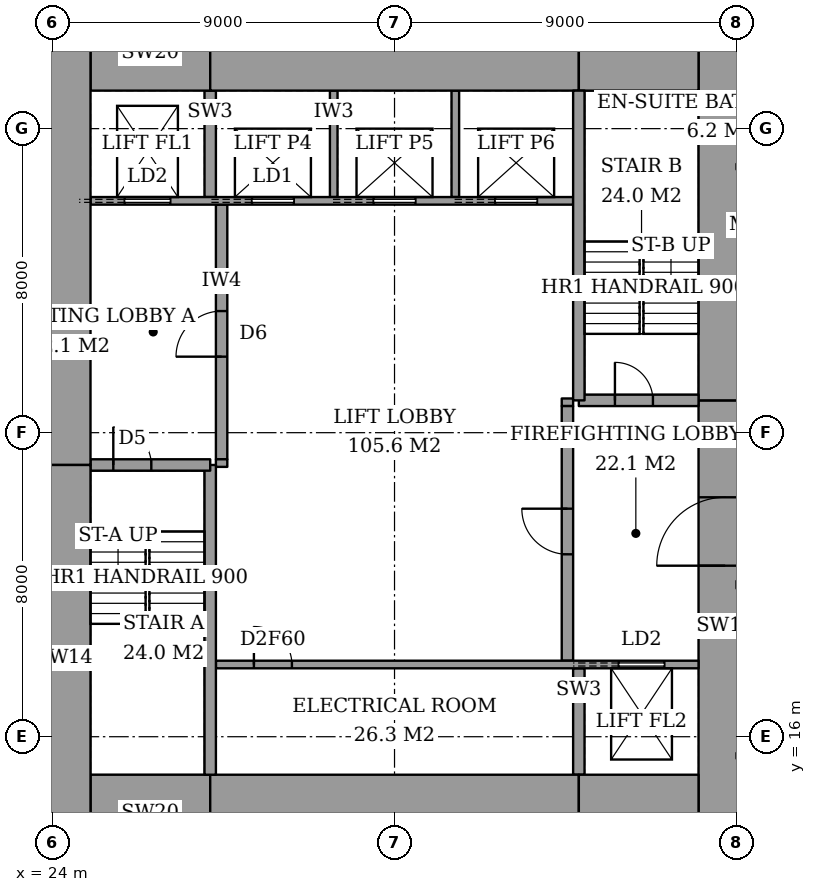
"""IFC4 building model, lengths in metres.
Left out: names, types, materials, properties, quantities, classifications, styles, units other than length and angle.
Written with IfcOpenShell. Run it as: python <this file> out.ifc"""

import sys

from ifc_helpers import new_model, si_unit, direction, frame, frame_2d, origin, place, context, subcontext, project, spatial, rectangle, extrude, element, fill, save


model = new_model("IFC4")
c1 = context("Model", 3, precision=1e-05, world=origin(), true_north=direction((0.0, 1.0)))
c2 = subcontext(c1, "Body", "Model", "MODEL_VIEW")
j1 = project(units=[si_unit("LENGTHUNIT", "METRE"), si_unit("PLANEANGLEUNIT", "RADIAN")], contexts=[c1])
p1 = place(None, origin())
s1 = spatial("IfcSite", under=j1, at=p1, CompositionType="ELEMENT")
p2 = place(p1, origin())
s2 = spatial("IfcBuilding", under=s1, at=p2, CompositionType="ELEMENT")
p3 = place(p2, frame((0.0, 0.0, 255.6)))
s3 = spatial("IfcBuildingStorey", under=s2, at=p3, CompositionType="ELEMENT", Elevation=255.6)
p4 = place(p3, frame((25.0, 14.0, 0.0), z_axis=(0.0, 0.0, 1.0), x_axis=(1.0, 0.0, 0.0)))
e1 = element("IfcWall", 1, at=p4, inside=s3, PredefinedType="SHEAR", context=c2, shape_type="SweptSolid", body=[
    extrude(rectangle(XDim=3.15, YDim=2.0, at=frame_2d((1.575, 0.0))), origin(), (0.0, 0.0, 1.0), 3.6),
])
p5 = place(p3, frame((28.15, 14.0, 0.0), z_axis=(0.0, 0.0, 1.0), x_axis=(1.0, 0.0, 0.0)))
e2 = element("IfcWall", 2, at=p5, inside=s3, PredefinedType="SHEAR", context=c2, shape_type="SweptSolid", body=[
    extrude(rectangle(XDim=9.7, YDim=2.0, at=frame_2d((4.85, 0.0))), origin(), (0.0, 0.0, 1.0), 3.6),
])
for number, where, z_axis, x_axis in (
    (3, (37.85, 14.0, 0.0), (0.0, 0.0, 1.0), (1.0, 0.0, 0.0)),
    (4, (25.0, 34.0, 0.0), (0.0, 0.0, 1.0), (1.0, 0.0, 0.0)),
):
    element("IfcWall", number, at=place(p3, frame(where, z_axis=z_axis, x_axis=x_axis)), inside=s3, PredefinedType="SHEAR", context=c2, shape_type="SweptSolid", body=[
        extrude(rectangle(XDim=3.15, YDim=2.0, at=frame_2d((1.575, 0.0))), origin(), (0.0, 0.0, 1.0), 3.6),
    ])
p6 = place(p3, frame((28.15, 34.0, 0.0), z_axis=(0.0, 0.0, 1.0), x_axis=(1.0, 0.0, 0.0)))
e5 = element("IfcWall", 5, at=p6, inside=s3, PredefinedType="SHEAR", context=c2, shape_type="SweptSolid", body=[
    extrude(rectangle(XDim=9.7, YDim=2.0, at=frame_2d((4.85, 0.0))), origin(), (0.0, 0.0, 1.0), 3.6),
])
p7 = place(p3, frame((37.85, 34.0, 0.0), z_axis=(0.0, 0.0, 1.0), x_axis=(1.0, 0.0, 0.0)))
e6 = element("IfcWall", 6, at=p7, inside=s3, PredefinedType="SHEAR", context=c2, shape_type="SweptSolid", body=[
    extrude(rectangle(XDim=3.15, YDim=2.0, at=frame_2d((1.575, 0.0))), origin(), (0.0, 0.0, 1.0), 3.6),
])
p8 = place(p3, frame((24.3, 13.0, 0.0), z_axis=(0.0, 0.0, 1.0), x_axis=(0.0, 1.0, 0.0)))
e7 = element("IfcWall", 7, at=p8, inside=s3, PredefinedType="SHEAR", context=c2, shape_type="SweptSolid", body=[
    extrude(rectangle(XDim=10.15, YDim=1.4, at=frame_2d((5.075, 0.0))), origin(), (0.0, 0.0, 1.0), 3.6),
])
p9 = place(p3, frame((24.3, 23.15, 0.0), z_axis=(0.0, 0.0, 1.0), x_axis=(0.0, 1.0, 0.0)))
e8 = element("IfcWall", 8, at=p9, inside=s3, PredefinedType="SHEAR", context=c2, shape_type="SweptSolid", body=[
    extrude(rectangle(XDim=11.85, YDim=1.4, at=frame_2d((5.925, 0.0))), origin(), (0.0, 0.0, 1.0), 3.6),
])
p10 = place(p3, frame((41.7, 13.0, 0.0), z_axis=(0.0, 0.0, 1.0), x_axis=(0.0, 1.0, 0.0)))
e9 = element("IfcWall", 9, at=p10, inside=s3, PredefinedType="SHEAR", context=c2, shape_type="SweptSolid", body=[
    extrude(rectangle(XDim=11.85, YDim=1.4, at=frame_2d((5.925, 0.0))), origin(), (0.0, 0.0, 1.0), 3.6),
])
p11 = place(p10, frame((7.5, 0.0, 0.0)))
e10 = element("IfcOpeningElement", 10, at=p11, cuts=e9, PredefinedType="OPENING", context=c2, shape_type="SweptSolid", body=[
    extrude(rectangle(XDim=1.8, YDim=2.4, at=frame_2d((0.9, 1.2))), frame((0.0, 0.71, 0.0), z_axis=(0.0, -1.0, 0.0), x_axis=(1.0, 0.0, 0.0)), (0.0, 0.0, 1.0), 1.42),
])
p12 = place(p3, frame((41.7, 24.85, 0.0), z_axis=(0.0, 0.0, 1.0), x_axis=(0.0, 1.0, 0.0)))
e11 = element("IfcWall", 11, at=p12, inside=s3, PredefinedType="SHEAR", context=c2, shape_type="SweptSolid", body=[
    extrude(rectangle(XDim=10.15, YDim=1.4, at=frame_2d((5.075, 0.0))), origin(), (0.0, 0.0, 1.0), 3.6),
])
p13 = place(p3, frame((28.15, 15.0, 0.0), z_axis=(0.0, 0.0, 1.0), x_axis=(0.0, 1.0, 0.0)))
e12 = element("IfcWall", 12, at=p13, inside=s3, PredefinedType="SHEAR", context=c2, shape_type="SweptSolid", body=[
    extrude(rectangle(XDim=8.15, YDim=0.3, at=frame_2d((4.075, 0.0))), origin(), (0.0, 0.0, 1.0), 3.6),
])
p14 = place(p3, frame((25.0, 23.15, 0.0), z_axis=(0.0, 0.0, 1.0), x_axis=(1.0, 0.0, 0.0)))
e13 = element("IfcWall", 13, at=p14, inside=s3, PredefinedType="SHEAR", context=c2, shape_type="SweptSolid", body=[
    extrude(rectangle(XDim=3.15, YDim=0.3, at=frame_2d((1.575, 0.0))), origin(), (0.0, 0.0, 1.0), 3.6),
])
p15 = place(p14, frame((0.6, 0.0, 0.0)))
e14 = element("IfcOpeningElement", 14, at=p15, cuts=e13, PredefinedType="OPENING", context=c2, shape_type="SweptSolid", body=[
    extrude(rectangle(XDim=1.0, YDim=2.1, at=frame_2d((0.5, 1.05))), frame((0.0, 0.16, 0.0), z_axis=(0.0, -1.0, 0.0), x_axis=(1.0, 0.0, 0.0)), (0.0, 0.0, 1.0), 0.32),
])
p16 = place(p3, frame((37.85, 24.85, 0.0), z_axis=(0.0, 0.0, 1.0), x_axis=(0.0, 1.0, 0.0)))
e15 = element("IfcWall", 15, at=p16, inside=s3, PredefinedType="SHEAR", context=c2, shape_type="SweptSolid", body=[
    extrude(rectangle(XDim=8.15, YDim=0.3, at=frame_2d((4.075, 0.0))), origin(), (0.0, 0.0, 1.0), 3.6),
])
p17 = place(p3, frame((37.85, 24.85, 0.0), z_axis=(0.0, 0.0, 1.0), x_axis=(1.0, 0.0, 0.0)))
e16 = element("IfcWall", 16, at=p17, inside=s3, PredefinedType="SHEAR", context=c2, shape_type="SweptSolid", body=[
    extrude(rectangle(XDim=3.15, YDim=0.3, at=frame_2d((1.575, 0.0))), origin(), (0.0, 0.0, 1.0), 3.6),
])
p18 = place(p17, frame((0.95, 0.0, 0.0)))
e17 = element("IfcOpeningElement", 17, at=p18, cuts=e16, PredefinedType="OPENING", context=c2, shape_type="SweptSolid", body=[
    extrude(rectangle(XDim=1.0, YDim=2.1, at=frame_2d((0.5, 1.05))), frame((0.0, 0.16, 0.0), z_axis=(0.0, -1.0, 0.0), x_axis=(1.0, 0.0, 0.0)), (0.0, 0.0, 1.0), 0.32),
])
p19 = place(p3, frame((28.45, 23.3, 0.0), z_axis=(0.0, 0.0, 1.0), x_axis=(0.0, 1.0, 0.0)))
e18 = element("IfcWall", 18, at=p19, inside=s3, PredefinedType="PARTITIONING", context=c2, shape_type="SweptSolid", body=[
    extrude(rectangle(XDim=6.7, YDim=0.3, at=frame_2d((3.35, 0.0))), origin(), (0.0, 0.0, 1.0), 3.6),
])
p20 = place(p19, frame((2.7, 0.0, 0.0)))
e19 = element("IfcOpeningElement", 19, at=p20, cuts=e18, PredefinedType="OPENING", context=c2, shape_type="SweptSolid", body=[
    extrude(rectangle(XDim=1.2, YDim=2.1, at=frame_2d((0.6, 1.05))), frame((0.0, 0.16, 0.0), z_axis=(0.0, -1.0, 0.0), x_axis=(1.0, 0.0, 0.0)), (0.0, 0.0, 1.0), 0.32),
])
p21 = place(p3, frame((37.55, 18.0, 0.0), z_axis=(0.0, 0.0, 1.0), x_axis=(0.0, 1.0, 0.0)))
e20 = element("IfcWall", 20, at=p21, inside=s3, PredefinedType="PARTITIONING", context=c2, shape_type="SweptSolid", body=[
    extrude(rectangle(XDim=6.7, YDim=0.3, at=frame_2d((3.35, 0.0))), origin(), (0.0, 0.0, 1.0), 3.6),
])
p22 = place(p21, frame((2.8, 0.0, 0.0)))
e21 = element("IfcOpeningElement", 21, at=p22, cuts=e20, PredefinedType="OPENING", context=c2, shape_type="SweptSolid", body=[
    extrude(rectangle(XDim=1.2, YDim=2.1, at=frame_2d((0.6, 1.05))), frame((0.0, 0.16, 0.0), z_axis=(0.0, -1.0, 0.0), x_axis=(1.0, 0.0, 0.0)), (0.0, 0.0, 1.0), 0.32),
])
p23 = place(p3, frame((28.3, 17.9, 0.0), z_axis=(0.0, 0.0, 1.0), x_axis=(1.0, 0.0, 0.0)))
e22 = element("IfcWall", 22, at=p23, inside=s3, PredefinedType="PARTITIONING", context=c2, shape_type="SweptSolid", body=[
    extrude(rectangle(XDim=12.7, YDim=0.2, at=frame_2d((6.35, 0.0))), origin(), (0.0, 0.0, 1.0), 3.6),
])
p24 = place(p23, frame((1.0, 0.0, 0.0)))
e23 = element("IfcOpeningElement", 23, at=p24, cuts=e22, PredefinedType="OPENING", context=c2, shape_type="SweptSolid", body=[
    extrude(rectangle(XDim=1.0, YDim=2.1, at=frame_2d((0.5, 1.05))), frame((0.0, 0.11, 0.0), z_axis=(0.0, -1.0, 0.0), x_axis=(1.0, 0.0, 0.0)), (0.0, 0.0, 1.0), 0.22),
])
p25 = place(p23, frame((10.6, 0.0, 0.0)))
e24 = element("IfcOpeningElement", 24, at=p25, cuts=e22, PredefinedType="OPENING", context=c2, shape_type="SweptSolid", body=[
    extrude(rectangle(XDim=1.2, YDim=2.1, at=frame_2d((0.6, 1.05))), frame((0.0, 0.11, 0.0), z_axis=(0.0, -1.0, 0.0), x_axis=(1.0, 0.0, 0.0)), (0.0, 0.0, 1.0), 0.22),
])
p26 = place(p3, frame((25.0, 30.1, 0.0), z_axis=(0.0, 0.0, 1.0), x_axis=(1.0, 0.0, 0.0)))
e25 = element("IfcWall", 25, at=p26, inside=s3, PredefinedType="PARTITIONING", context=c2, shape_type="SweptSolid", body=[
    extrude(rectangle(XDim=12.7, YDim=0.2, at=frame_2d((6.35, 0.0))), origin(), (0.0, 0.0, 1.0), 3.6),
])
p27 = place(p26, frame((4.25, 0.0, 0.0)))
e26 = element("IfcOpeningElement", 26, at=p27, cuts=e25, PredefinedType="OPENING", context=c2, shape_type="SweptSolid", body=[
    extrude(rectangle(XDim=1.1, YDim=2.1, at=frame_2d((0.55, 1.05))), frame((0.0, 0.11, 0.0), z_axis=(0.0, -1.0, 0.0), x_axis=(1.0, 0.0, 0.0)), (0.0, 0.0, 1.0), 0.22),
])
p28 = place(p26, frame((7.45, 0.0, 0.0)))
e27 = element("IfcOpeningElement", 27, at=p28, cuts=e25, PredefinedType="OPENING", context=c2, shape_type="SweptSolid", body=[
    extrude(rectangle(XDim=1.1, YDim=2.1, at=frame_2d((0.55, 1.05))), frame((0.0, 0.11, 0.0), z_axis=(0.0, -1.0, 0.0), x_axis=(1.0, 0.0, 0.0)), (0.0, 0.0, 1.0), 0.22),
])
p29 = place(p26, frame((10.65, 0.0, 0.0)))
e28 = element("IfcOpeningElement", 28, at=p29, cuts=e25, PredefinedType="OPENING", context=c2, shape_type="SweptSolid", body=[
    extrude(rectangle(XDim=1.1, YDim=2.1, at=frame_2d((0.55, 1.05))), frame((0.0, 0.11, 0.0), z_axis=(0.0, -1.0, 0.0), x_axis=(1.0, 0.0, 0.0)), (0.0, 0.0, 1.0), 0.22),
])
p30 = place(p26, frame((0.9, 0.0, 0.0)))
e29 = element("IfcOpeningElement", 29, at=p30, cuts=e25, PredefinedType="OPENING", context=c2, shape_type="SweptSolid", body=[
    extrude(rectangle(XDim=1.2, YDim=2.1, at=frame_2d((0.6, 1.05))), frame((0.0, 0.11, 0.0), z_axis=(0.0, -1.0, 0.0), x_axis=(1.0, 0.0, 0.0)), (0.0, 0.0, 1.0), 0.22),
])
p31 = place(p3, frame((37.85, 15.0, 0.0), z_axis=(0.0, 0.0, 1.0), x_axis=(0.0, 1.0, 0.0)))
e30 = element("IfcWall", 30, at=p31, inside=s3, PredefinedType="SHEAR", context=c2, shape_type="SweptSolid", body=[
    extrude(rectangle(XDim=2.8, YDim=0.3, at=frame_2d((1.4, 0.0))), origin(), (0.0, 0.0, 1.0), 3.6),
])
for number, where, z_axis, x_axis in (
    (31, (31.4, 30.2, 0.0), (0.0, 0.0, 1.0), (0.0, 1.0, 0.0)),
    (32, (34.6, 30.2, 0.0), (0.0, 0.0, 1.0), (0.0, 1.0, 0.0)),
):
    element("IfcWall", number, at=place(p3, frame(where, z_axis=z_axis, x_axis=x_axis)), inside=s3, PredefinedType="PARTITIONING", context=c2, shape_type="SweptSolid", body=[
        extrude(rectangle(XDim=2.8, YDim=0.2, at=frame_2d((1.4, 0.0))), origin(), (0.0, 0.0, 1.0), 3.6),
    ])
p32 = place(p3, frame((28.15, 30.2, 0.0), z_axis=(0.0, 0.0, 1.0), x_axis=(0.0, 1.0, 0.0)))
e33 = element("IfcWall", 33, at=p32, inside=s3, PredefinedType="SHEAR", context=c2, shape_type="SweptSolid", body=[
    extrude(rectangle(XDim=2.8, YDim=0.3, at=frame_2d((1.4, 0.0))), origin(), (0.0, 0.0, 1.0), 3.6),
])
for number, where, z_axis, x_axis in (
    (34, (28.3, 23.2, 0.0), (0.0, 0.0, 1.0), (1.0, 0.0, 0.0)),
    (35, (37.4, 24.8, 0.0), (0.0, 0.0, 1.0), (1.0, 0.0, 0.0)),
):
    element("IfcWall", number, at=place(p3, frame(where, z_axis=z_axis, x_axis=x_axis)), inside=s3, PredefinedType="PARTITIONING", context=c2, shape_type="SweptSolid", body=[
        extrude(rectangle(XDim=0.3, YDim=0.2, at=frame_2d((0.15, 0.0))), origin(), (0.0, 0.0, 1.0), 3.6),
    ])
p33 = place(p15, origin())
e36 = element("IfcDoor", 36, at=p33, inside=s3, OperationType="SINGLE_SWING_RIGHT", PredefinedType="DOOR", context=c2, shape_type="SweptSolid", body=[
    extrude(rectangle(XDim=1.0, YDim=2.1, at=frame_2d((0.5, 1.05))), frame((0.0, 0.025, 0.0), z_axis=(0.0, -1.0, 0.0), x_axis=(1.0, 0.0, 0.0)), (0.0, 0.0, 1.0), 0.05),
])
fill(e14, e36)
p34 = place(p18, origin())
e37 = element("IfcDoor", 37, at=p34, inside=s3, OperationType="SINGLE_SWING_RIGHT", PredefinedType="DOOR", context=c2, shape_type="SweptSolid", body=[
    extrude(rectangle(XDim=1.0, YDim=2.1, at=frame_2d((0.5, 1.05))), frame((0.0, 0.025, 0.0), z_axis=(0.0, -1.0, 0.0), x_axis=(1.0, 0.0, 0.0)), (0.0, 0.0, 1.0), 0.05),
])
fill(e17, e37)
p35 = place(p20, origin())
e38 = element("IfcDoor", 38, at=p35, inside=s3, OperationType="SINGLE_SWING_RIGHT", PredefinedType="DOOR", context=c2, shape_type="SweptSolid", body=[
    extrude(rectangle(XDim=1.2, YDim=2.1, at=frame_2d((0.6, 1.05))), frame((0.0, 0.025, 0.0), z_axis=(0.0, -1.0, 0.0), x_axis=(1.0, 0.0, 0.0)), (0.0, 0.0, 1.0), 0.05),
])
fill(e19, e38)
p36 = place(p22, origin())
e39 = element("IfcDoor", 39, at=p36, inside=s3, OperationType="SINGLE_SWING_LEFT", PredefinedType="DOOR", context=c2, shape_type="SweptSolid", body=[
    extrude(rectangle(XDim=1.2, YDim=2.1, at=frame_2d((0.6, 1.05))), frame((0.0, 0.025, 0.0), z_axis=(0.0, -1.0, 0.0), x_axis=(1.0, 0.0, 0.0)), (0.0, 0.0, 1.0), 0.05),
])
fill(e21, e39)
p37 = place(p11, origin())
e40 = element("IfcDoor", 40, at=p37, inside=s3, OperationType="DOUBLE_DOOR_DOUBLE_SWING", PredefinedType="DOOR", context=c2, shape_type="SweptSolid", body=[
    extrude(rectangle(XDim=1.8, YDim=2.4, at=frame_2d((0.9, 1.2))), frame((0.0, 0.025, 0.0), z_axis=(0.0, -1.0, 0.0), x_axis=(1.0, 0.0, 0.0)), (0.0, 0.0, 1.0), 0.05),
])
fill(e10, e40)
p38 = place(p24, origin())
e41 = element("IfcDoor", 41, at=p38, inside=s3, OperationType="SINGLE_SWING_RIGHT", PredefinedType="DOOR", context=c2, shape_type="SweptSolid", body=[
    extrude(rectangle(XDim=1.0, YDim=2.1, at=frame_2d((0.5, 1.05))), frame((0.0, 0.025, 0.0), z_axis=(0.0, -1.0, 0.0), x_axis=(1.0, 0.0, 0.0)), (0.0, 0.0, 1.0), 0.05),
])
fill(e23, e41)
p39 = place(p27, origin())
e42 = element("IfcDoor", 42, at=p39, inside=s3, OperationType="SLIDING_TO_LEFT", PredefinedType="DOOR", context=c2, shape_type="SweptSolid", body=[
    extrude(rectangle(XDim=1.1, YDim=2.1, at=frame_2d((0.55, 1.05))), frame((0.0, 0.025, 0.0), z_axis=(0.0, -1.0, 0.0), x_axis=(1.0, 0.0, 0.0)), (0.0, 0.0, 1.0), 0.05),
])
fill(e26, e42)
p40 = place(p28, origin())
e43 = element("IfcDoor", 43, at=p40, inside=s3, OperationType="SLIDING_TO_LEFT", PredefinedType="DOOR", context=c2, shape_type="SweptSolid", body=[
    extrude(rectangle(XDim=1.1, YDim=2.1, at=frame_2d((0.55, 1.05))), frame((0.0, 0.025, 0.0), z_axis=(0.0, -1.0, 0.0), x_axis=(1.0, 0.0, 0.0)), (0.0, 0.0, 1.0), 0.05),
])
fill(e27, e43)
p41 = place(p29, origin())
e44 = element("IfcDoor", 44, at=p41, inside=s3, OperationType="SLIDING_TO_LEFT", PredefinedType="DOOR", context=c2, shape_type="SweptSolid", body=[
    extrude(rectangle(XDim=1.1, YDim=2.1, at=frame_2d((0.55, 1.05))), frame((0.0, 0.025, 0.0), z_axis=(0.0, -1.0, 0.0), x_axis=(1.0, 0.0, 0.0)), (0.0, 0.0, 1.0), 0.05),
])
fill(e28, e44)
p42 = place(p30, origin())
e45 = element("IfcDoor", 45, at=p42, inside=s3, OperationType="SLIDING_TO_LEFT", PredefinedType="DOOR", context=c2, shape_type="SweptSolid", body=[
    extrude(rectangle(XDim=1.2, YDim=2.1, at=frame_2d((0.6, 1.05))), frame((0.0, 0.025, 0.0), z_axis=(0.0, -1.0, 0.0), x_axis=(1.0, 0.0, 0.0)), (0.0, 0.0, 1.0), 0.05),
])
fill(e29, e45)
p43 = place(p25, origin())
e46 = element("IfcDoor", 46, at=p43, inside=s3, OperationType="SLIDING_TO_LEFT", PredefinedType="DOOR", context=c2, shape_type="SweptSolid", body=[
    extrude(rectangle(XDim=1.2, YDim=2.1, at=frame_2d((0.6, 1.05))), frame((0.0, 0.025, 0.0), z_axis=(0.0, -1.0, 0.0), x_axis=(1.0, 0.0, 0.0)), (0.0, 0.0, 1.0), 0.05),
])
fill(e24, e46)
save(model, sys.argv[1])
